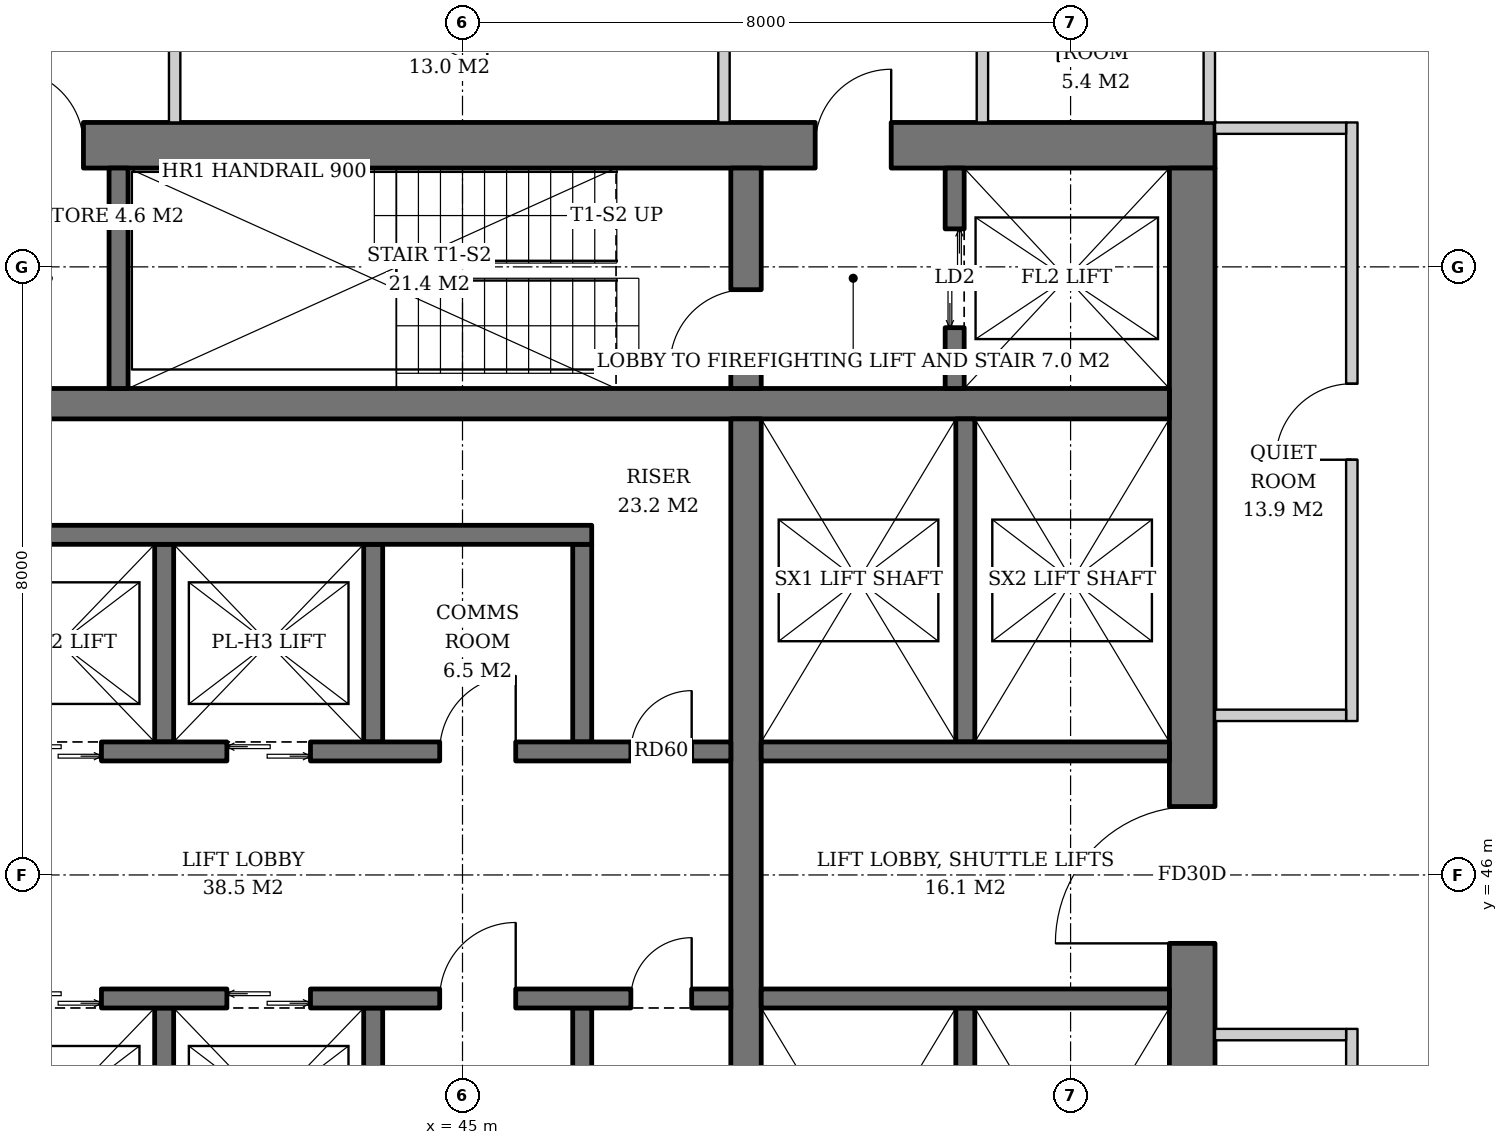
"""IFC4 building model, lengths in metres.
Left out: names, types, materials, properties, quantities, classifications, styles, units other than length and angle.
Written with IfcOpenShell. Run it as: python <this file> out.ifc"""

import sys

from ifc_helpers import new_model, si_unit, direction, frame, frame_2d, origin, place, context, subcontext, project, spatial, rectangle, extrude, element, fill, save


model = new_model("IFC4")
c1 = context("Model", 3, precision=1e-05, world=origin(), true_north=direction((0.0, 1.0)))
c2 = subcontext(c1, "Body", "Model", "MODEL_VIEW")
j1 = project(units=[si_unit("LENGTHUNIT", "METRE"), si_unit("PLANEANGLEUNIT", "RADIAN")], contexts=[c1])
p1 = place(None, origin())
s1 = spatial("IfcSite", under=j1, at=p1, CompositionType="ELEMENT")
p2 = place(p1, origin())
s2 = spatial("IfcBuilding", under=s1, at=p2, CompositionType="ELEMENT")
p3 = place(p2, frame((0.0, 0.0, 222.4)))
s3 = spatial("IfcBuildingStorey", under=s2, at=p3, CompositionType="ELEMENT", Elevation=222.4)
p4 = place(p3, frame((35.1, 55.6, 0.0), z_axis=(0.0, 0.0, 1.0), x_axis=(1.0, 0.0, 0.0)))
e1 = element("IfcWall", 1, at=p4, inside=s3, PredefinedType="SHEAR", context=c2, shape_type="SweptSolid", body=[
    extrude(rectangle(XDim=19.8, YDim=0.6, at=frame_2d((9.9, 0.0))), origin(), (0.0, 0.0, 1.0), 3.8),
])
p5 = place(p4, frame((14.54, 0.0, 0.0)))
e2 = element("IfcOpeningElement", 2, at=p5, cuts=e1, PredefinedType="OPENING", context=c2, shape_type="SweptSolid", body=[
    extrude(rectangle(XDim=1.0, YDim=2.1, at=frame_2d((0.5, 1.05))), frame((0.0, 0.31, 0.0), z_axis=(0.0, -1.0, 0.0), x_axis=(1.0, 0.0, 0.0)), (0.0, 0.0, 1.0), 0.62),
])
p6 = place(p4, frame((1.8, 0.0, 0.0)))
e3 = element("IfcOpeningElement", 3, at=p6, cuts=e1, PredefinedType="OPENING", context=c2, shape_type="SweptSolid", body=[
    extrude(rectangle(XDim=1.0, YDim=2.1, at=frame_2d((0.5, 1.05))), frame((0.0, 0.31, 0.0), z_axis=(0.0, -1.0, 0.0), x_axis=(1.0, 0.0, 0.0)), (0.0, 0.0, 1.0), 0.62),
])
p7 = place(p4, frame((3.913, 0.0, 0.0)))
e4 = element("IfcOpeningElement", 4, at=p7, cuts=e1, PredefinedType="OPENING", context=c2, shape_type="SweptSolid", body=[
    extrude(rectangle(XDim=1.0, YDim=2.1, at=frame_2d((0.5, 1.05))), frame((0.0, 0.31, 0.0), z_axis=(0.0, -1.0, 0.0), x_axis=(1.0, 0.0, 0.0)), (0.0, 0.0, 1.0), 0.62),
])
p8 = place(p3, frame((54.6, 36.7, 0.0), z_axis=(0.0, 0.0, 1.0), x_axis=(0.0, 1.0, 0.0)))
e5 = element("IfcWall", 5, at=p8, inside=s3, PredefinedType="SHEAR", context=c2, shape_type="SweptSolid", body=[
    extrude(rectangle(XDim=18.6, YDim=0.6, at=frame_2d((9.3, 0.0))), origin(), (0.0, 0.0, 1.0), 3.8),
])
p9 = place(p8, frame((8.4, 0.0, 0.0)))
e6 = element("IfcOpeningElement", 6, at=p9, cuts=e5, PredefinedType="OPENING", context=c2, shape_type="SweptSolid", body=[
    extrude(rectangle(XDim=1.8, YDim=2.4, at=frame_2d((0.9, 1.2))), frame((0.0, 0.31, 0.0), z_axis=(0.0, -1.0, 0.0), x_axis=(1.0, 0.0, 0.0)), (0.0, 0.0, 1.0), 0.62),
])
p10 = place(p3, frame((35.7, 52.2, 0.0), z_axis=(0.0, 0.0, 1.0), x_axis=(1.0, 0.0, 0.0)))
e7 = element("IfcWall", 7, at=p10, inside=s3, PredefinedType="SHEAR", context=c2, shape_type="SweptSolid", body=[
    extrude(rectangle(XDim=18.6, YDim=0.4, at=frame_2d((9.3, 0.0))), origin(), (0.0, 0.0, 1.0), 3.8),
])
p11 = place(p3, frame((48.73, 40.0, 0.0), z_axis=(0.0, 0.0, 1.0), x_axis=(0.0, 1.0, 0.0)))
e8 = element("IfcWall", 8, at=p11, inside=s3, PredefinedType="SHEAR", context=c2, shape_type="SweptSolid", body=[
    extrude(rectangle(XDim=12.0, YDim=0.4, at=frame_2d((6.0, 0.0))), origin(), (0.0, 0.0, 1.0), 3.8),
])
p12 = place(p3, frame((48.73, 52.4, 0.0), z_axis=(0.0, 0.0, 1.0), x_axis=(0.0, 1.0, 0.0)))
e9 = element("IfcWall", 9, at=p12, inside=s3, PredefinedType="SHEAR", context=c2, shape_type="SweptSolid", body=[
    extrude(rectangle(XDim=2.9, YDim=0.4, at=frame_2d((1.45, 0.0))), origin(), (0.0, 0.0, 1.0), 3.8),
])
p13 = place(p12, frame((0.3, 0.0, 0.0)))
e10 = element("IfcOpeningElement", 10, at=p13, cuts=e9, PredefinedType="OPENING", context=c2, shape_type="SweptSolid", body=[
    extrude(rectangle(XDim=1.0, YDim=2.1, at=frame_2d((0.5, 1.05))), frame((0.0, 0.21, 0.0), z_axis=(0.0, -1.0, 0.0), x_axis=(1.0, 0.0, 0.0)), (0.0, 0.0, 1.0), 0.42),
])
p14 = place(p3, frame((40.475, 52.4, 0.0), z_axis=(0.0, 0.0, 1.0), x_axis=(0.0, 1.0, 0.0)))
e11 = element("IfcWall", 11, at=p14, inside=s3, PredefinedType="SHEAR", context=c2, shape_type="SweptSolid", body=[
    extrude(rectangle(XDim=2.9, YDim=0.25, at=frame_2d((1.45, 0.0))), origin(), (0.0, 0.0, 1.0), 3.8),
])
p15 = place(p3, frame((51.475, 52.4, 0.0), z_axis=(0.0, 0.0, 1.0), x_axis=(0.0, 1.0, 0.0)))
e12 = element("IfcWall", 12, at=p15, inside=s3, PredefinedType="SHEAR", context=c2, shape_type="SweptSolid", body=[
    extrude(rectangle(XDim=2.9, YDim=0.25, at=frame_2d((1.45, 0.0))), origin(), (0.0, 0.0, 1.0), 3.8),
])
p16 = place(p15, frame((0.8, 0.0, 0.0)))
e13 = element("IfcOpeningElement", 13, at=p16, cuts=e12, PredefinedType="OPENING", context=c2, shape_type="SweptSolid", body=[
    extrude(rectangle(XDim=1.3, YDim=2.2, at=frame_2d((0.65, 1.1))), frame((0.0, 0.135, 0.0), z_axis=(0.0, -1.0, 0.0), x_axis=(1.0, 0.0, 0.0)), (0.0, 0.0, 1.0), 0.27),
])
for number, where, z_axis, x_axis in (
    (14, (41.075, 47.75, 0.0), (0.0, 0.0, 1.0), (0.0, 1.0, 0.0)),
    (15, (43.825, 47.75, 0.0), (0.0, 0.0, 1.0), (0.0, 1.0, 0.0)),
    (16, (46.575, 47.75, 0.0), (0.0, 0.0, 1.0), (0.0, 1.0, 0.0)),
):
    element("IfcWall", number, at=place(p3, frame(where, z_axis=z_axis, x_axis=x_axis)), inside=s3, PredefinedType="SHEAR", context=c2, shape_type="SweptSolid", body=[
        extrude(rectangle(XDim=2.6, YDim=0.25, at=frame_2d((1.3, 0.0))), origin(), (0.0, 0.0, 1.0), 3.8),
    ])
p17 = place(p3, frame((35.7, 50.475, 0.0), z_axis=(0.0, 0.0, 1.0), x_axis=(1.0, 0.0, 0.0)))
e17 = element("IfcWall", 17, at=p17, inside=s3, PredefinedType="SHEAR", context=c2, shape_type="SweptSolid", body=[
    extrude(rectangle(XDim=11.0, YDim=0.25, at=frame_2d((5.5, 0.0))), origin(), (0.0, 0.0, 1.0), 3.8),
])
p18 = place(p3, frame((35.7, 47.625, 0.0), z_axis=(0.0, 0.0, 1.0), x_axis=(1.0, 0.0, 0.0)))
e18 = element("IfcWall", 18, at=p18, inside=s3, PredefinedType="SHEAR", context=c2, shape_type="SweptSolid", body=[
    extrude(rectangle(XDim=12.83, YDim=0.25, at=frame_2d((6.415, 0.0))), origin(), (0.0, 0.0, 1.0), 3.8),
])
p19 = place(p18, frame((0.7, 0.0, 0.0)))
e19 = element("IfcOpeningElement", 19, at=p19, cuts=e18, PredefinedType="OPENING", context=c2, shape_type="SweptSolid", body=[
    extrude(rectangle(XDim=1.1, YDim=2.2, at=frame_2d((0.55, 1.1))), frame((0.0, 0.135, 0.0), z_axis=(0.0, -1.0, 0.0), x_axis=(1.0, 0.0, 0.0)), (0.0, 0.0, 1.0), 0.27),
])
p20 = place(p18, frame((3.45, 0.0, 0.0)))
e20 = element("IfcOpeningElement", 20, at=p20, cuts=e18, PredefinedType="OPENING", context=c2, shape_type="SweptSolid", body=[
    extrude(rectangle(XDim=1.1, YDim=2.2, at=frame_2d((0.55, 1.1))), frame((0.0, 0.135, 0.0), z_axis=(0.0, -1.0, 0.0), x_axis=(1.0, 0.0, 0.0)), (0.0, 0.0, 1.0), 0.27),
])
p21 = place(p18, frame((6.2, 0.0, 0.0)))
e21 = element("IfcOpeningElement", 21, at=p21, cuts=e18, PredefinedType="OPENING", context=c2, shape_type="SweptSolid", body=[
    extrude(rectangle(XDim=1.1, YDim=2.2, at=frame_2d((0.55, 1.1))), frame((0.0, 0.135, 0.0), z_axis=(0.0, -1.0, 0.0), x_axis=(1.0, 0.0, 0.0)), (0.0, 0.0, 1.0), 0.27),
])
p22 = place(p18, frame((9.0, 0.0, 0.0)))
e22 = element("IfcOpeningElement", 22, at=p22, cuts=e18, PredefinedType="OPENING", context=c2, shape_type="SweptSolid", body=[
    extrude(rectangle(XDim=1.0, YDim=2.1, at=frame_2d((0.5, 1.05))), frame((0.0, 0.135, 0.0), z_axis=(0.0, -1.0, 0.0), x_axis=(1.0, 0.0, 0.0)), (0.0, 0.0, 1.0), 0.27),
])
p23 = place(p18, frame((11.515, 0.0, 0.0)))
e23 = element("IfcOpeningElement", 23, at=p23, cuts=e18, PredefinedType="OPENING", context=c2, shape_type="SweptSolid", body=[
    extrude(rectangle(XDim=0.8, YDim=2.0, at=frame_2d((0.4, 1.0))), frame((0.0, 0.135, 0.0), z_axis=(0.0, -1.0, 0.0), x_axis=(1.0, 0.0, 0.0)), (0.0, 0.0, 1.0), 0.27),
])
for number, where, z_axis, x_axis in (
    (24, (41.075, 44.25, 0.0), (0.0, 0.0, 1.0), (0.0, -1.0, 0.0)),
    (25, (43.825, 44.25, 0.0), (0.0, 0.0, 1.0), (0.0, -1.0, 0.0)),
    (26, (46.575, 44.25, 0.0), (0.0, 0.0, 1.0), (0.0, -1.0, 0.0)),
):
    element("IfcWall", number, at=place(p3, frame(where, z_axis=z_axis, x_axis=x_axis)), inside=s3, PredefinedType="SHEAR", context=c2, shape_type="SweptSolid", body=[
        extrude(rectangle(XDim=2.6, YDim=0.25, at=frame_2d((1.3, 0.0))), origin(), (0.0, 0.0, 1.0), 3.8),
    ])
p24 = place(p3, frame((35.7, 44.375, 0.0), z_axis=(0.0, 0.0, 1.0), x_axis=(1.0, 0.0, 0.0)))
e27 = element("IfcWall", 27, at=p24, inside=s3, PredefinedType="SHEAR", context=c2, shape_type="SweptSolid", body=[
    extrude(rectangle(XDim=12.83, YDim=0.25, at=frame_2d((6.415, 0.0))), origin(), (0.0, 0.0, 1.0), 3.8),
])
p25 = place(p24, frame((0.7, 0.0, 0.0)))
e28 = element("IfcOpeningElement", 28, at=p25, cuts=e27, PredefinedType="OPENING", context=c2, shape_type="SweptSolid", body=[
    extrude(rectangle(XDim=1.1, YDim=2.2, at=frame_2d((0.55, 1.1))), frame((0.0, 0.135, 0.0), z_axis=(0.0, -1.0, 0.0), x_axis=(1.0, 0.0, 0.0)), (0.0, 0.0, 1.0), 0.27),
])
p26 = place(p24, frame((3.45, 0.0, 0.0)))
e29 = element("IfcOpeningElement", 29, at=p26, cuts=e27, PredefinedType="OPENING", context=c2, shape_type="SweptSolid", body=[
    extrude(rectangle(XDim=1.1, YDim=2.2, at=frame_2d((0.55, 1.1))), frame((0.0, 0.135, 0.0), z_axis=(0.0, -1.0, 0.0), x_axis=(1.0, 0.0, 0.0)), (0.0, 0.0, 1.0), 0.27),
])
p27 = place(p24, frame((6.2, 0.0, 0.0)))
e30 = element("IfcOpeningElement", 30, at=p27, cuts=e27, PredefinedType="OPENING", context=c2, shape_type="SweptSolid", body=[
    extrude(rectangle(XDim=1.1, YDim=2.2, at=frame_2d((0.55, 1.1))), frame((0.0, 0.135, 0.0), z_axis=(0.0, -1.0, 0.0), x_axis=(1.0, 0.0, 0.0)), (0.0, 0.0, 1.0), 0.27),
])
p28 = place(p24, frame((9.0, 0.0, 0.0)))
e31 = element("IfcOpeningElement", 31, at=p28, cuts=e27, PredefinedType="OPENING", context=c2, shape_type="SweptSolid", body=[
    extrude(rectangle(XDim=1.0, YDim=2.1, at=frame_2d((0.5, 1.05))), frame((0.0, 0.135, 0.0), z_axis=(0.0, -1.0, 0.0), x_axis=(1.0, 0.0, 0.0)), (0.0, 0.0, 1.0), 0.27),
])
p29 = place(p24, frame((11.515, 0.0, 0.0)))
e32 = element("IfcOpeningElement", 32, at=p29, cuts=e27, PredefinedType="OPENING", context=c2, shape_type="SweptSolid", body=[
    extrude(rectangle(XDim=0.8, YDim=2.0, at=frame_2d((0.4, 1.0))), frame((0.0, 0.135, 0.0), z_axis=(0.0, -1.0, 0.0), x_axis=(1.0, 0.0, 0.0)), (0.0, 0.0, 1.0), 0.27),
])
p30 = place(p3, frame((51.615, 47.75, 0.0), z_axis=(0.0, 0.0, 1.0), x_axis=(0.0, 1.0, 0.0)))
e33 = element("IfcWall", 33, at=p30, inside=s3, PredefinedType="SHEAR", context=c2, shape_type="SweptSolid", body=[
    extrude(rectangle(XDim=4.25, YDim=0.25, at=frame_2d((2.125, 0.0))), origin(), (0.0, 0.0, 1.0), 3.8),
])
p31 = place(p3, frame((48.93, 47.625, 0.0), z_axis=(0.0, 0.0, 1.0), x_axis=(1.0, 0.0, 0.0)))
e34 = element("IfcWall", 34, at=p31, inside=s3, PredefinedType="SHEAR", context=c2, shape_type="SweptSolid", body=[
    extrude(rectangle(XDim=5.37, YDim=0.25, at=frame_2d((2.685, 0.0))), origin(), (0.0, 0.0, 1.0), 3.8),
])
p32 = place(p3, frame((51.615, 44.25, 0.0), z_axis=(0.0, 0.0, 1.0), x_axis=(0.0, -1.0, 0.0)))
e35 = element("IfcWall", 35, at=p32, inside=s3, PredefinedType="SHEAR", context=c2, shape_type="SweptSolid", body=[
    extrude(rectangle(XDim=4.25, YDim=0.25, at=frame_2d((2.125, 0.0))), origin(), (0.0, 0.0, 1.0), 3.8),
])
p33 = place(p3, frame((48.93, 44.375, 0.0), z_axis=(0.0, 0.0, 1.0), x_axis=(1.0, 0.0, 0.0)))
e36 = element("IfcWall", 36, at=p33, inside=s3, PredefinedType="SHEAR", context=c2, shape_type="SweptSolid", body=[
    extrude(rectangle(XDim=5.37, YDim=0.25, at=frame_2d((2.685, 0.0))), origin(), (0.0, 0.0, 1.0), 3.8),
])
p34 = place(p3, frame((56.7, 36.1, 0.0), z_axis=(0.0, 0.0, 1.0), x_axis=(0.0, 1.0, 0.0)))
e37 = element("IfcWall", 37, at=p34, inside=s3, PredefinedType="PARTITIONING", context=c2, shape_type="SweptSolid", body=[
    extrude(rectangle(XDim=7.875, YDim=0.15, at=frame_2d((3.938, 0.0))), origin(), (0.0, 0.0, 1.0), 2.706),
])
p35 = place(p34, frame((3.438, 0.0, 0.0)))
e38 = element("IfcOpeningElement", 38, at=p35, cuts=e37, PredefinedType="OPENING", context=c2, shape_type="SweptSolid", body=[
    extrude(rectangle(XDim=1.0, YDim=2.1, at=frame_2d((0.5, 1.05))), frame((0.0, 0.085, 0.0), z_axis=(0.0, -1.0, 0.0), x_axis=(1.0, 0.0, 0.0)), (0.0, 0.0, 1.0), 0.17),
])
p36 = place(p3, frame((54.9, 43.9, 0.0), z_axis=(0.0, 0.0, 1.0), x_axis=(1.0, 0.0, 0.0)))
e39 = element("IfcWall", 39, at=p36, inside=s3, PredefinedType="PARTITIONING", context=c2, shape_type="SweptSolid", body=[
    extrude(rectangle(XDim=1.725, YDim=0.15, at=frame_2d((0.863, 0.0))), origin(), (0.0, 0.0, 1.0), 3.52),
])
p37 = place(p3, frame((56.7, 48.025, 0.0), z_axis=(0.0, 0.0, 1.0), x_axis=(0.0, 1.0, 0.0)))
e40 = element("IfcWall", 40, at=p37, inside=s3, PredefinedType="PARTITIONING", context=c2, shape_type="SweptSolid", body=[
    extrude(rectangle(XDim=7.875, YDim=0.15, at=frame_2d((3.938, 0.0))), origin(), (0.0, 0.0, 1.0), 2.706),
])
p38 = place(p37, frame((3.438, 0.0, 0.0)))
e41 = element("IfcOpeningElement", 41, at=p38, cuts=e40, PredefinedType="OPENING", context=c2, shape_type="SweptSolid", body=[
    extrude(rectangle(XDim=1.0, YDim=2.1, at=frame_2d((0.5, 1.05))), frame((0.0, 0.085, 0.0), z_axis=(0.0, -1.0, 0.0), x_axis=(1.0, 0.0, 0.0)), (0.0, 0.0, 1.0), 0.17),
])
for number, where, z_axis, x_axis in (
    (42, (54.9, 48.1, 0.0), (0.0, 0.0, 1.0), (1.0, 0.0, 0.0)),
    (43, (54.9, 55.825, 0.0), (0.0, 0.0, 1.0), (1.0, 0.0, 0.0)),
):
    element("IfcWall", number, at=place(p3, frame(where, z_axis=z_axis, x_axis=x_axis)), inside=s3, PredefinedType="PARTITIONING", context=c2, shape_type="SweptSolid", body=[
        extrude(rectangle(XDim=1.725, YDim=0.15, at=frame_2d((0.863, 0.0))), origin(), (0.0, 0.0, 1.0), 3.52),
    ])
p39 = place(p3, frame((54.825, 55.9, 0.0), z_axis=(0.0, 0.0, 1.0), x_axis=(0.0, 1.0, 0.0)))
e44 = element("IfcWall", 44, at=p39, inside=s3, PredefinedType="PARTITIONING", context=c2, shape_type="SweptSolid", body=[
    extrude(rectangle(XDim=1.725, YDim=0.15, at=frame_2d((0.863, 0.0))), origin(), (0.0, 0.0, 1.0), 2.92),
])
for number, where, z_axis, x_axis in (
    (45, (51.84, 55.9, 0.0), (0.0, 0.0, 1.0), (0.0, 1.0, 0.0)),
    (46, (48.44, 55.9, 0.0), (0.0, 0.0, 1.0), (0.0, 1.0, 0.0)),
):
    element("IfcWall", number, at=place(p3, frame(where, z_axis=z_axis, x_axis=x_axis)), inside=s3, PredefinedType="PARTITIONING", context=c2, shape_type="SweptSolid", body=[
        extrude(rectangle(XDim=1.725, YDim=0.15, at=frame_2d((0.863, 0.0))), origin(), (0.0, 0.0, 1.0), 3.52),
    ])
p40 = place(p3, frame((41.213, 55.9, 0.0), z_axis=(0.0, 0.0, 1.0), x_axis=(0.0, 1.0, 0.0)))
e47 = element("IfcWall", 47, at=p40, inside=s3, PredefinedType="PARTITIONING", context=c2, shape_type="SweptSolid", body=[
    extrude(rectangle(XDim=1.725, YDim=0.15, at=frame_2d((0.863, 0.0))), origin(), (0.0, 0.0, 1.0), 2.706),
])
p41 = place(p16, origin())
e48 = element("IfcDoor", 48, at=p41, inside=s3, OperationType="DOUBLE_DOOR_SLIDING", PredefinedType="DOOR", context=c2, shape_type="SweptSolid", body=[
    extrude(rectangle(XDim=1.3, YDim=2.2, at=frame_2d((0.65, 1.1))), frame((0.0, 0.025, 0.0), z_axis=(0.0, -1.0, 0.0), x_axis=(1.0, 0.0, 0.0)), (0.0, 0.0, 1.0), 0.05),
])
fill(e13, e48)
p42 = place(p20, origin())
e49 = element("IfcDoor", 49, at=p42, inside=s3, OperationType="DOUBLE_DOOR_SLIDING", PredefinedType="DOOR", context=c2, shape_type="SweptSolid", body=[
    extrude(rectangle(XDim=1.1, YDim=2.2, at=frame_2d((0.55, 1.1))), frame((0.0, 0.025, 0.0), z_axis=(0.0, -1.0, 0.0), x_axis=(1.0, 0.0, 0.0)), (0.0, 0.0, 1.0), 0.05),
])
fill(e20, e49)
p43 = place(p21, origin())
e50 = element("IfcDoor", 50, at=p43, inside=s3, OperationType="DOUBLE_DOOR_SLIDING", PredefinedType="DOOR", context=c2, shape_type="SweptSolid", body=[
    extrude(rectangle(XDim=1.1, YDim=2.2, at=frame_2d((0.55, 1.1))), frame((0.0, 0.025, 0.0), z_axis=(0.0, -1.0, 0.0), x_axis=(1.0, 0.0, 0.0)), (0.0, 0.0, 1.0), 0.05),
])
fill(e21, e50)
p44 = place(p22, origin())
e51 = element("IfcDoor", 51, at=p44, inside=s3, OperationType="SINGLE_SWING_RIGHT", PredefinedType="DOOR", context=c2, shape_type="SweptSolid", body=[
    extrude(rectangle(XDim=1.0, YDim=2.1, at=frame_2d((0.5, 1.05))), frame((0.0, 0.025, 0.0), z_axis=(0.0, -1.0, 0.0), x_axis=(1.0, 0.0, 0.0)), (0.0, 0.0, 1.0), 0.05),
])
fill(e22, e51)
p45 = place(p23, origin())
e52 = element("IfcDoor", 52, at=p45, inside=s3, OperationType="SINGLE_SWING_RIGHT", PredefinedType="DOOR", context=c2, shape_type="SweptSolid", body=[
    extrude(rectangle(XDim=0.8, YDim=2.0, at=frame_2d((0.4, 1.0))), frame((0.0, 0.025, 0.0), z_axis=(0.0, -1.0, 0.0), x_axis=(1.0, 0.0, 0.0)), (0.0, 0.0, 1.0), 0.05),
])
fill(e23, e52)
p46 = place(p26, origin())
e53 = element("IfcDoor", 53, at=p46, inside=s3, OperationType="DOUBLE_DOOR_SLIDING", PredefinedType="DOOR", context=c2, shape_type="SweptSolid", body=[
    extrude(rectangle(XDim=1.1, YDim=2.2, at=frame_2d((0.55, 1.1))), frame((0.0, 0.025, 0.0), z_axis=(0.0, -1.0, 0.0), x_axis=(1.0, 0.0, 0.0)), (0.0, 0.0, 1.0), 0.05),
])
fill(e29, e53)
p47 = place(p27, origin())
e54 = element("IfcDoor", 54, at=p47, inside=s3, OperationType="DOUBLE_DOOR_SLIDING", PredefinedType="DOOR", context=c2, shape_type="SweptSolid", body=[
    extrude(rectangle(XDim=1.1, YDim=2.2, at=frame_2d((0.55, 1.1))), frame((0.0, 0.025, 0.0), z_axis=(0.0, -1.0, 0.0), x_axis=(1.0, 0.0, 0.0)), (0.0, 0.0, 1.0), 0.05),
])
fill(e30, e54)
p48 = place(p28, origin())
e55 = element("IfcDoor", 55, at=p48, inside=s3, OperationType="SINGLE_SWING_RIGHT", PredefinedType="DOOR", context=c2, shape_type="SweptSolid", body=[
    extrude(rectangle(XDim=1.0, YDim=2.1, at=frame_2d((0.5, 1.05))), frame((0.0, 0.025, 0.0), z_axis=(0.0, -1.0, 0.0), x_axis=(1.0, 0.0, 0.0)), (0.0, 0.0, 1.0), 0.05),
])
fill(e31, e55)
p49 = place(p29, origin())
e56 = element("IfcDoor", 56, at=p49, inside=s3, OperationType="SINGLE_SWING_RIGHT", PredefinedType="DOOR", context=c2, shape_type="SweptSolid", body=[
    extrude(rectangle(XDim=0.8, YDim=2.0, at=frame_2d((0.4, 1.0))), frame((0.0, 0.025, 0.0), z_axis=(0.0, -1.0, 0.0), x_axis=(1.0, 0.0, 0.0)), (0.0, 0.0, 1.0), 0.05),
])
fill(e32, e56)
p50 = place(p13, origin())
e57 = element("IfcDoor", 57, at=p50, inside=s3, OperationType="SINGLE_SWING_LEFT", PredefinedType="DOOR", context=c2, shape_type="SweptSolid", body=[
    extrude(rectangle(XDim=1.0, YDim=2.1, at=frame_2d((0.5, 1.05))), frame((0.0, 0.025, 0.0), z_axis=(0.0, -1.0, 0.0), x_axis=(1.0, 0.0, 0.0)), (0.0, 0.0, 1.0), 0.05),
])
fill(e10, e57)
p51 = place(p5, origin())
e58 = element("IfcDoor", 58, at=p51, inside=s3, OperationType="SINGLE_SWING_RIGHT", PredefinedType="DOOR", context=c2, shape_type="SweptSolid", body=[
    extrude(rectangle(XDim=1.0, YDim=2.1, at=frame_2d((0.5, 1.05))), frame((0.0, 0.025, 0.0), z_axis=(0.0, -1.0, 0.0), x_axis=(1.0, 0.0, 0.0)), (0.0, 0.0, 1.0), 0.05),
])
fill(e2, e58)
p52 = place(p9, origin())
e59 = element("IfcDoor", 59, at=p52, inside=s3, OperationType="DOUBLE_DOOR_SINGLE_SWING", PredefinedType="DOOR", context=c2, shape_type="SweptSolid", body=[
    extrude(rectangle(XDim=1.8, YDim=2.4, at=frame_2d((0.9, 1.2))), frame((0.0, 0.025, 0.0), z_axis=(0.0, -1.0, 0.0), x_axis=(1.0, 0.0, 0.0)), (0.0, 0.0, 1.0), 0.05),
])
fill(e6, e59)
p53 = place(p7, origin())
e60 = element("IfcDoor", 60, at=p53, inside=s3, OperationType="SINGLE_SWING_LEFT", PredefinedType="DOOR", context=c2, shape_type="SweptSolid", body=[
    extrude(rectangle(XDim=1.0, YDim=2.1, at=frame_2d((0.5, 1.05))), frame((0.0, -0.24, 0.0), z_axis=(0.0, -1.0, 0.0), x_axis=(1.0, 0.0, 0.0)), (0.0, 0.0, 1.0), 0.05),
])
fill(e4, e60)
p54 = place(p38, origin())
e61 = element("IfcDoor", 61, at=p54, inside=s3, OperationType="SINGLE_SWING_LEFT", PredefinedType="DOOR", context=c2, shape_type="SweptSolid", body=[
    extrude(rectangle(XDim=1.0, YDim=2.1, at=frame_2d((0.5, 1.05))), frame((0.0, 0.025, 0.0), z_axis=(0.0, -1.0, 0.0), x_axis=(1.0, 0.0, 0.0)), (0.0, 0.0, 1.0), 0.05),
])
fill(e41, e61)
save(model, sys.argv[1])
